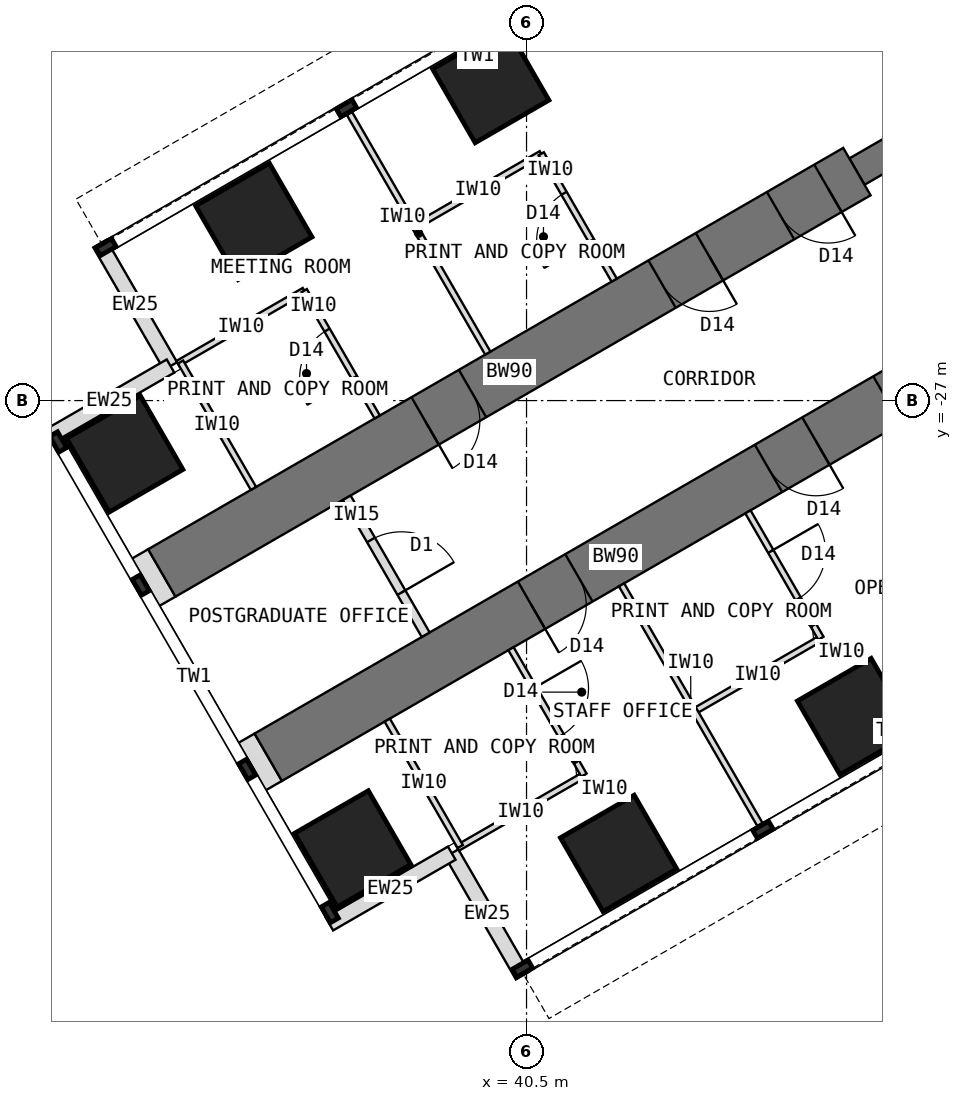
"""IFC4 building model, lengths in metres.
Left out: names, types, materials, properties, quantities, classifications, styles, units other than length and angle.
Written with IfcOpenShell. Run it as: python <this file> out.ifc"""

import sys

from ifc_helpers import new_model, si_unit, direction, frame, frame_2d, origin, origin_2d, place, context, subcontext, project, spatial, rectangle, extrude, element, fill, save


model = new_model("IFC4")
c1 = context("Model", 3, precision=1e-05, world=origin(), true_north=direction((0.0, 1.0)))
c2 = subcontext(c1, "Body", "Model", "MODEL_VIEW")
j1 = project(units=[si_unit("LENGTHUNIT", "METRE"), si_unit("PLANEANGLEUNIT", "RADIAN")], contexts=[c1])
p1 = place(None, origin())
s1 = spatial("IfcSite", under=j1, at=p1, CompositionType="ELEMENT")
p2 = place(p1, origin())
s2 = spatial("IfcBuilding", under=s1, at=p2, CompositionType="ELEMENT")
p3 = place(p2, frame((0.0, 0.0, 76.5)))
s3 = spatial("IfcBuildingStorey", under=s2, at=p3, CompositionType="ELEMENT", Elevation=76.5)
p4 = place(p3, frame((45.904, -18.0, 0.0), z_axis=(0.0, 0.0, 1.0), x_axis=(0.500024481964, -0.866011268655, 0.0)))
e1 = element("IfcWall", 1, at=p4, inside=s3, PredefinedType="SHEAR", context=c2, shape_type="SweptSolid", body=[
    extrude(rectangle(XDim=4.548, YDim=0.7, at=frame_2d((2.274, 0.0))), origin(), (0.0, 0.0, 1.0), 4.0),
])
p5 = place(p3, frame((47.684, -26.266, 0.0), z_axis=(0.0, 0.0, 1.0), x_axis=(-0.866027579429, -0.499996231654, 0.0)))
e2 = element("IfcWall", 2, at=p5, inside=s3, PredefinedType="SHEAR", context=c2, shape_type="SweptSolid", body=[
    extrude(rectangle(XDim=13.2, YDim=0.9, at=frame_2d((6.6, 0.0))), origin(), (0.0, 0.0, 1.0), 4.0),
])
p6 = place(p5, frame((0.55, 0.0, 0.0)))
e3 = element("IfcOpeningElement", 3, at=p6, cuts=e2, PredefinedType="OPENING", context=c2, shape_type="SweptSolid", body=[
    extrude(rectangle(XDim=0.9, YDim=2.1, at=frame_2d((0.45, 1.05))), frame((0.0, 0.46, 0.0), z_axis=(0.0, -1.0, 0.0), x_axis=(1.0, 0.0, 0.0)), (0.0, 0.0, 1.0), 0.92),
])
p7 = place(p5, frame((2.8, 0.0, 0.0)))
e4 = element("IfcOpeningElement", 4, at=p7, cuts=e2, PredefinedType="OPENING", context=c2, shape_type="SweptSolid", body=[
    extrude(rectangle(XDim=0.9, YDim=2.1, at=frame_2d((0.45, 1.05))), frame((0.0, 0.46, 0.0), z_axis=(0.0, -1.0, 0.0), x_axis=(1.0, 0.0, 0.0)), (0.0, 0.0, 1.0), 0.92),
])
p8 = place(p5, frame((7.3, 0.0, 0.0)))
e5 = element("IfcOpeningElement", 5, at=p8, cuts=e2, PredefinedType="OPENING", context=c2, shape_type="SweptSolid", body=[
    extrude(rectangle(XDim=0.9, YDim=2.1, at=frame_2d((0.45, 1.05))), frame((0.0, 0.46, 0.0), z_axis=(0.0, -1.0, 0.0), x_axis=(1.0, 0.0, 0.0)), (0.0, 0.0, 1.0), 0.92),
])
p9 = place(p3, frame((48.178, -21.939, 0.0), z_axis=(0.0, 0.0, 1.0), x_axis=(-0.866072649678, -0.499918158782, 0.0)))
e6 = element("IfcWall", 6, at=p9, inside=s3, PredefinedType="SHEAR", context=c2, shape_type="SweptSolid", body=[
    extrude(rectangle(XDim=2.592, YDim=0.5, at=frame_2d((1.296, 0.0))), origin(), (0.0, 0.0, 1.0), 4.0),
])
p10 = place(p3, frame((45.934, -23.234, 0.0), z_axis=(0.0, 0.0, 1.0), x_axis=(-0.866019570528, -0.500010103361, 0.0)))
e7 = element("IfcWall", 7, at=p10, inside=s3, PredefinedType="SHEAR", context=c2, shape_type="SweptSolid", body=[
    extrude(rectangle(XDim=13.2, YDim=0.9, at=frame_2d((6.6, 0.0))), origin(), (0.0, 0.0, 1.0), 4.0),
])
p11 = place(p10, frame((0.55, 0.0, 0.0)))
e8 = element("IfcOpeningElement", 8, at=p11, cuts=e7, PredefinedType="OPENING", context=c2, shape_type="SweptSolid", body=[
    extrude(rectangle(XDim=0.9, YDim=2.1, at=frame_2d((0.45, 1.05))), frame((0.0, 0.46, 0.0), z_axis=(0.0, -1.0, 0.0), x_axis=(1.0, 0.0, 0.0)), (0.0, 0.0, 1.0), 0.92),
])
p12 = place(p10, frame((2.8, 0.0, 0.0)))
e9 = element("IfcOpeningElement", 9, at=p12, cuts=e7, PredefinedType="OPENING", context=c2, shape_type="SweptSolid", body=[
    extrude(rectangle(XDim=0.9, YDim=2.1, at=frame_2d((0.45, 1.05))), frame((0.0, 0.46, 0.0), z_axis=(0.0, -1.0, 0.0), x_axis=(1.0, 0.0, 0.0)), (0.0, 0.0, 1.0), 0.92),
])
p13 = place(p10, frame((7.3, 0.0, 0.0)))
e10 = element("IfcOpeningElement", 10, at=p13, cuts=e7, PredefinedType="OPENING", context=c2, shape_type="SweptSolid", body=[
    extrude(rectangle(XDim=0.9, YDim=2.1, at=frame_2d((0.45, 1.05))), frame((0.0, 0.46, 0.0), z_axis=(0.0, -1.0, 0.0), x_axis=(1.0, 0.0, 0.0)), (0.0, 0.0, 1.0), 0.92),
])
for number, where, z_axis, x_axis in (
    (11, (45.912, -32.196, 0.0), (0.0, 0.0, 1.0), (0.866, 0.5, 0.0)),
    (12, (39.912, -21.804, 0.0), (0.0, 0.0, 1.0), (0.866, 0.5, 0.0)),
    (13, (42.014, -34.446, 0.0), (0.0, 0.0, 1.0), (0.866, 0.5, 0.0)),
    (14, (36.014, -24.054, 0.0), (0.0, 0.0, 1.0), (0.866, 0.5, 0.0)),
    (15, (37.642, -34.373, 0.0), (0.0, 0.0, 1.0), (0.866, 0.5, 0.0)),
    (16, (33.892, -27.877, 0.0), (0.0, 0.0, 1.0), (0.866, 0.5, 0.0)),
):
    element("IfcColumn", number, at=place(p3, frame(where, z_axis=z_axis, x_axis=x_axis)), inside=s3, PredefinedType="COLUMN", context=c2, shape_type="SweptSolid", body=[
        extrude(rectangle(XDim=1.4, YDim=1.4, at=origin_2d()), origin(), (0.0, 0.0, 1.0), 4.0),
    ])
for number, where, z_axis, x_axis in (
    (17, (40.433, -36.456, 0.0), (0.0, 0.0, 1.0), (-0.5, 0.866, 0.0)),
    (18, (39.27, -34.443, 0.0), (0.0, 0.0, 1.0), (-0.866, -0.5, 0.0)),
    (19, (33.483, -24.419, 0.0), (0.0, 0.0, 1.0), (0.5, -0.866, 0.0)),
    (20, (34.645, -26.432, 0.0), (0.0, 0.0, 1.0), (-0.866, -0.5, 0.0)),
):
    element("IfcWall", number, at=place(p3, frame(where, z_axis=z_axis, x_axis=x_axis)), inside=s3, PredefinedType="STANDARD", context=c2, shape_type="SweptSolid", body=[
        extrude(rectangle(XDim=2.325, YDim=0.25, at=frame_2d((1.163, 0.0))), origin(), (0.0, 0.0, 1.0), 3.8),
    ])
for number, where, z_axis, x_axis in (
    (21, (36.252, -32.865, 0.0), (0.0, 0.0, 1.0), (-0.866, -0.5, 0.0)),
    (22, (34.502, -29.834, 0.0), (0.0, 0.0, 1.0), (-0.866, -0.5, 0.0)),
):
    element("IfcWall", number, at=place(p3, frame(where, z_axis=z_axis, x_axis=x_axis)), inside=s3, PredefinedType="PARTITIONING", context=c2, shape_type="SweptSolid", body=[
        extrude(rectangle(XDim=0.31, YDim=0.9, at=frame_2d((0.155, 0.0))), origin(), (0.0, 0.0, 1.0), 3.8),
    ])
p14 = place(p3, frame((42.063, -30.03, 0.0), z_axis=(0.0, 0.0, 1.0), x_axis=(0.499982560684, -0.866035472144, 0.0)))
e23 = element("IfcWall", 23, at=p14, inside=s3, PredefinedType="PARTITIONING", context=c2, shape_type="SweptSolid", body=[
    extrude(rectangle(XDim=4.55, YDim=0.1, at=frame_2d((2.275, 0.0))), origin(), (0.0, 0.0, 1.0), 3.8),
])
p15 = place(p3, frame((45.342, -30.909, 0.0), z_axis=(0.0, 0.0, 1.0), x_axis=(-0.866050077142, -0.499957262057, 0.0)))
e24 = element("IfcWall", 24, at=p15, inside=s3, PredefinedType="PARTITIONING", context=c2, shape_type="SweptSolid", body=[
    extrude(rectangle(XDim=2.4, YDim=0.1, at=frame_2d((1.2, 0.0))), origin(), (0.0, 0.0, 1.0), 3.8),
])
p16 = place(p3, frame((44.141, -28.83, 0.0), z_axis=(0.0, 0.0, 1.0), x_axis=(0.500077600433, -0.865980596518, 0.0)))
e25 = element("IfcWall", 25, at=p16, inside=s3, PredefinedType="PARTITIONING", context=c2, shape_type="SweptSolid", body=[
    extrude(rectangle(XDim=2.4, YDim=0.1, at=frame_2d((1.2, 0.0))), origin(), (0.0, 0.0, 1.0), 3.8),
])
p17 = place(p16, frame((0.75, 0.0, 0.0)))
e26 = element("IfcOpeningElement", 26, at=p17, cuts=e25, PredefinedType="OPENING", context=c2, shape_type="SweptSolid", body=[
    extrude(rectangle(XDim=0.9, YDim=2.1, at=frame_2d((0.45, 1.05))), frame((0.0, 0.06, 0.0), z_axis=(0.0, -1.0, 0.0), x_axis=(1.0, 0.0, 0.0)), (0.0, 0.0, 1.0), 0.12),
])
p18 = place(p3, frame((41.444, -33.159, 0.0), z_axis=(0.0, 0.0, 1.0), x_axis=(-0.866024647952, -0.500001309137, 0.0)))
e27 = element("IfcWall", 27, at=p18, inside=s3, PredefinedType="PARTITIONING", context=c2, shape_type="SweptSolid", body=[
    extrude(rectangle(XDim=2.4, YDim=0.1, at=frame_2d((1.2, 0.0))), origin(), (0.0, 0.0, 1.0), 3.8),
])
p19 = place(p3, frame((40.244, -31.08, 0.0), z_axis=(0.0, 0.0, 1.0), x_axis=(0.500001309137, -0.866024647952, 0.0)))
e28 = element("IfcWall", 28, at=p19, inside=s3, PredefinedType="PARTITIONING", context=c2, shape_type="SweptSolid", body=[
    extrude(rectangle(XDim=2.4, YDim=0.1, at=frame_2d((1.2, 0.0))), origin(), (0.0, 0.0, 1.0), 3.8),
])
p20 = place(p19, frame((0.75, 0.0, 0.0)))
e29 = element("IfcOpeningElement", 29, at=p20, cuts=e28, PredefinedType="OPENING", context=c2, shape_type="SweptSolid", body=[
    extrude(rectangle(XDim=0.9, YDim=2.1, at=frame_2d((0.45, 1.05))), frame((0.0, 0.06, 0.0), z_axis=(0.0, -1.0, 0.0), x_axis=(1.0, 0.0, 0.0)), (0.0, 0.0, 1.0), 0.12),
])
p21 = place(p3, frame((38.209, -32.255, 0.0), z_axis=(0.0, 0.0, 1.0), x_axis=(0.500001309137, -0.866024647952, 0.0)))
e30 = element("IfcWall", 30, at=p21, inside=s3, PredefinedType="PARTITIONING", context=c2, shape_type="SweptSolid", body=[
    extrude(rectangle(XDim=2.4, YDim=0.1, at=frame_2d((1.2, 0.0))), origin(), (0.0, 0.0, 1.0), 3.8),
])
p22 = place(p3, frame((39.863, -26.22, 0.0), z_axis=(0.0, 0.0, 1.0), x_axis=(-0.500022803284, 0.866012237902, 0.0)))
e31 = element("IfcWall", 31, at=p22, inside=s3, PredefinedType="PARTITIONING", context=c2, shape_type="SweptSolid", body=[
    extrude(rectangle(XDim=4.55, YDim=0.1, at=frame_2d((2.275, 0.0))), origin(), (0.0, 0.0, 1.0), 3.8),
])
p23 = place(p3, frame((40.741, -22.941, 0.0), z_axis=(0.0, 0.0, 1.0), x_axis=(-0.865980596518, -0.500077600433, 0.0)))
e32 = element("IfcWall", 32, at=p23, inside=s3, PredefinedType="PARTITIONING", context=c2, shape_type="SweptSolid", body=[
    extrude(rectangle(XDim=2.4, YDim=0.1, at=frame_2d((1.2, 0.0))), origin(), (0.0, 0.0, 1.0), 3.8),
])
p24 = place(p3, frame((41.941, -25.02, 0.0), z_axis=(0.0, 0.0, 1.0), x_axis=(-0.499957262057, 0.866050077142, 0.0)))
e33 = element("IfcWall", 33, at=p24, inside=s3, PredefinedType="PARTITIONING", context=c2, shape_type="SweptSolid", body=[
    extrude(rectangle(XDim=2.4, YDim=0.1, at=frame_2d((1.2, 0.0))), origin(), (0.0, 0.0, 1.0), 3.8),
])
p25 = place(p24, frame((0.75, 0.0, 0.0)))
e34 = element("IfcOpeningElement", 34, at=p25, cuts=e33, PredefinedType="OPENING", context=c2, shape_type="SweptSolid", body=[
    extrude(rectangle(XDim=0.9, YDim=2.1, at=frame_2d((0.45, 1.05))), frame((0.0, 0.06, 0.0), z_axis=(0.0, -1.0, 0.0), x_axis=(1.0, 0.0, 0.0)), (0.0, 0.0, 1.0), 0.12),
])
p26 = place(p3, frame((36.844, -25.191, 0.0), z_axis=(0.0, 0.0, 1.0), x_axis=(-0.865980596518, -0.500077600433, 0.0)))
e35 = element("IfcWall", 35, at=p26, inside=s3, PredefinedType="PARTITIONING", context=c2, shape_type="SweptSolid", body=[
    extrude(rectangle(XDim=2.4, YDim=0.1, at=frame_2d((1.2, 0.0))), origin(), (0.0, 0.0, 1.0), 3.8),
])
p27 = place(p3, frame((38.044, -27.27, 0.0), z_axis=(0.0, 0.0, 1.0), x_axis=(-0.500033551112, 0.866006032174, 0.0)))
e36 = element("IfcWall", 36, at=p27, inside=s3, PredefinedType="PARTITIONING", context=c2, shape_type="SweptSolid", body=[
    extrude(rectangle(XDim=2.4, YDim=0.1, at=frame_2d((1.2, 0.0))), origin(), (0.0, 0.0, 1.0), 3.8),
])
p28 = place(p27, frame((0.75, 0.0, 0.0)))
e37 = element("IfcOpeningElement", 37, at=p28, cuts=e36, PredefinedType="OPENING", context=c2, shape_type="SweptSolid", body=[
    extrude(rectangle(XDim=0.9, YDim=2.1, at=frame_2d((0.45, 1.05))), frame((0.0, 0.06, 0.0), z_axis=(0.0, -1.0, 0.0), x_axis=(1.0, 0.0, 0.0)), (0.0, 0.0, 1.0), 0.12),
])
p29 = place(p3, frame((36.009, -28.445, 0.0), z_axis=(0.0, 0.0, 1.0), x_axis=(-0.500033551112, 0.866006032174, 0.0)))
e38 = element("IfcWall", 38, at=p29, inside=s3, PredefinedType="PARTITIONING", context=c2, shape_type="SweptSolid", body=[
    extrude(rectangle(XDim=2.4, YDim=0.1, at=frame_2d((1.2, 0.0))), origin(), (0.0, 0.0, 1.0), 3.8),
])
p30 = place(p3, frame((37.542, -28.599, 0.0), z_axis=(0.0, 0.0, 1.0), x_axis=(0.500006934395, -0.866021400173, 0.0)))
e39 = element("IfcWall", 39, at=p30, inside=s3, PredefinedType="PARTITIONING", context=c2, shape_type="SweptSolid", body=[
    extrude(rectangle(XDim=2.6, YDim=0.15, at=frame_2d((1.3, 0.0))), origin(), (0.0, 0.0, 1.0), 3.8),
])
p31 = place(p30, frame((0.8, 0.0, 0.0)))
e40 = element("IfcOpeningElement", 40, at=p31, cuts=e39, PredefinedType="OPENING", context=c2, shape_type="SweptSolid", body=[
    extrude(rectangle(XDim=1.0, YDim=2.1, at=frame_2d((0.5, 1.05))), frame((0.0, 0.085, 0.0), z_axis=(0.0, -1.0, 0.0), x_axis=(1.0, 0.0, 0.0)), (0.0, 0.0, 1.0), 0.17),
])
p32 = place(p17, origin())
e41 = element("IfcDoor", 41, at=p32, inside=s3, OperationType="SINGLE_SWING_LEFT", PredefinedType="DOOR", context=c2, shape_type="SweptSolid", body=[
    extrude(rectangle(XDim=0.9, YDim=2.1, at=frame_2d((0.45, 1.05))), frame((0.0, 0.025, 0.0), z_axis=(0.0, -1.0, 0.0), x_axis=(1.0, 0.0, 0.0)), (0.0, 0.0, 1.0), 0.05),
])
fill(e26, e41)
p33 = place(p20, origin())
e42 = element("IfcDoor", 42, at=p33, inside=s3, OperationType="SINGLE_SWING_LEFT", PredefinedType="DOOR", context=c2, shape_type="SweptSolid", body=[
    extrude(rectangle(XDim=0.9, YDim=2.1, at=frame_2d((0.45, 1.05))), frame((0.0, 0.025, 0.0), z_axis=(0.0, -1.0, 0.0), x_axis=(1.0, 0.0, 0.0)), (0.0, 0.0, 1.0), 0.05),
])
fill(e29, e42)
p34 = place(p25, origin())
e43 = element("IfcDoor", 43, at=p34, inside=s3, OperationType="SINGLE_SWING_LEFT", PredefinedType="DOOR", context=c2, shape_type="SweptSolid", body=[
    extrude(rectangle(XDim=0.9, YDim=2.1, at=frame_2d((0.45, 1.05))), frame((0.0, 0.025, 0.0), z_axis=(0.0, -1.0, 0.0), x_axis=(1.0, 0.0, 0.0)), (0.0, 0.0, 1.0), 0.05),
])
fill(e34, e43)
p35 = place(p28, origin())
e44 = element("IfcDoor", 44, at=p35, inside=s3, OperationType="SINGLE_SWING_LEFT", PredefinedType="DOOR", context=c2, shape_type="SweptSolid", body=[
    extrude(rectangle(XDim=0.9, YDim=2.1, at=frame_2d((0.45, 1.05))), frame((0.0, 0.025, 0.0), z_axis=(0.0, -1.0, 0.0), x_axis=(1.0, 0.0, 0.0)), (0.0, 0.0, 1.0), 0.05),
])
fill(e37, e44)
p36 = place(p31, origin())
e45 = element("IfcDoor", 45, at=p36, inside=s3, OperationType="SINGLE_SWING_RIGHT", PredefinedType="DOOR", context=c2, shape_type="SweptSolid", body=[
    extrude(rectangle(XDim=1.0, YDim=2.1, at=frame_2d((0.5, 1.05))), frame((0.0, 0.025, 0.0), z_axis=(0.0, -1.0, 0.0), x_axis=(1.0, 0.0, 0.0)), (0.0, 0.0, 1.0), 0.05),
])
fill(e40, e45)
p37 = place(p6, origin())
e46 = element("IfcDoor", 46, at=p37, inside=s3, OperationType="SINGLE_SWING_LEFT", PredefinedType="DOOR", context=c2, shape_type="SweptSolid", body=[
    extrude(rectangle(XDim=0.82, YDim=2.06, at=frame_2d((0.45, 1.03))), frame((0.0, 0.025, 0.0), z_axis=(0.0, -1.0, 0.0), x_axis=(1.0, 0.0, 0.0)), (0.0, 0.0, 1.0), 0.05),
    extrude(rectangle(XDim=0.04, YDim=2.1, at=frame_2d((0.02, 1.05))), frame((0.0, 0.45, 0.0), z_axis=(0.0, -1.0, 0.0), x_axis=(1.0, 0.0, 0.0)), (0.0, 0.0, 1.0), 0.899),
    extrude(rectangle(XDim=0.04, YDim=2.1, at=frame_2d((0.88, 1.05))), frame((0.0, 0.45, 0.0), z_axis=(0.0, -1.0, 0.0), x_axis=(1.0, 0.0, 0.0)), (0.0, 0.0, 1.0), 0.899),
    extrude(rectangle(XDim=0.82, YDim=0.04, at=frame_2d((0.45, 2.08))), frame((0.0, 0.45, 0.0), z_axis=(0.0, -1.0, 0.0), x_axis=(1.0, 0.0, 0.0)), (0.0, 0.0, 1.0), 0.899),
])
fill(e3, e46)
p38 = place(p7, origin())
e47 = element("IfcDoor", 47, at=p38, inside=s3, OperationType="SINGLE_SWING_LEFT", PredefinedType="DOOR", context=c2, shape_type="SweptSolid", body=[
    extrude(rectangle(XDim=0.82, YDim=2.06, at=frame_2d((0.45, 1.03))), frame((0.0, 0.025, 0.0), z_axis=(0.0, -1.0, 0.0), x_axis=(1.0, 0.0, 0.0)), (0.0, 0.0, 1.0), 0.05),
    extrude(rectangle(XDim=0.04, YDim=2.1, at=frame_2d((0.02, 1.05))), frame((0.0, 0.45, 0.0), z_axis=(0.0, -1.0, 0.0), x_axis=(1.0, 0.0, 0.0)), (0.0, 0.0, 1.0), 0.899),
    extrude(rectangle(XDim=0.04, YDim=2.1, at=frame_2d((0.88, 1.05))), frame((0.0, 0.45, 0.0), z_axis=(0.0, -1.0, 0.0), x_axis=(1.0, 0.0, 0.0)), (0.0, 0.0, 1.0), 0.899),
    extrude(rectangle(XDim=0.82, YDim=0.04, at=frame_2d((0.45, 2.08))), frame((0.0, 0.45, 0.0), z_axis=(0.0, -1.0, 0.0), x_axis=(1.0, 0.0, 0.0)), (0.0, 0.0, 1.0), 0.899),
])
fill(e4, e47)
p39 = place(p8, origin())
e48 = element("IfcDoor", 48, at=p39, inside=s3, OperationType="SINGLE_SWING_RIGHT", PredefinedType="DOOR", context=c2, shape_type="SweptSolid", body=[
    extrude(rectangle(XDim=0.82, YDim=2.06, at=frame_2d((0.45, 1.03))), frame((0.0, 0.025, 0.0), z_axis=(0.0, -1.0, 0.0), x_axis=(1.0, 0.0, 0.0)), (0.0, 0.0, 1.0), 0.05),
    extrude(rectangle(XDim=0.04, YDim=2.1, at=frame_2d((0.02, 1.05))), frame((0.0, 0.45, 0.0), z_axis=(0.0, -1.0, 0.0), x_axis=(1.0, 0.0, 0.0)), (0.0, 0.0, 1.0), 0.899),
    extrude(rectangle(XDim=0.04, YDim=2.1, at=frame_2d((0.88, 1.05))), frame((0.0, 0.45, 0.0), z_axis=(0.0, -1.0, 0.0), x_axis=(1.0, 0.0, 0.0)), (0.0, 0.0, 1.0), 0.899),
    extrude(rectangle(XDim=0.82, YDim=0.04, at=frame_2d((0.45, 2.08))), frame((0.0, 0.45, 0.0), z_axis=(0.0, -1.0, 0.0), x_axis=(1.0, 0.0, 0.0)), (0.0, 0.0, 1.0), 0.899),
])
fill(e5, e48)
p40 = place(p11, origin())
e49 = element("IfcDoor", 49, at=p40, inside=s3, OperationType="SINGLE_SWING_LEFT", PredefinedType="DOOR", context=c2, shape_type="SweptSolid", body=[
    extrude(rectangle(XDim=0.82, YDim=2.06, at=frame_2d((0.45, 1.03))), frame((0.0, 0.025, 0.0), z_axis=(0.0, -1.0, 0.0), x_axis=(1.0, 0.0, 0.0)), (0.0, 0.0, 1.0), 0.05),
    extrude(rectangle(XDim=0.04, YDim=2.1, at=frame_2d((0.02, 1.05))), frame((0.0, 0.45, 0.0), z_axis=(0.0, -1.0, 0.0), x_axis=(1.0, 0.0, 0.0)), (0.0, 0.0, 1.0), 0.899),
    extrude(rectangle(XDim=0.04, YDim=2.1, at=frame_2d((0.88, 1.05))), frame((0.0, 0.45, 0.0), z_axis=(0.0, -1.0, 0.0), x_axis=(1.0, 0.0, 0.0)), (0.0, 0.0, 1.0), 0.899),
    extrude(rectangle(XDim=0.82, YDim=0.04, at=frame_2d((0.45, 2.08))), frame((0.0, 0.45, 0.0), z_axis=(0.0, -1.0, 0.0), x_axis=(1.0, 0.0, 0.0)), (0.0, 0.0, 1.0), 0.899),
])
fill(e8, e49)
p41 = place(p12, origin())
e50 = element("IfcDoor", 50, at=p41, inside=s3, OperationType="SINGLE_SWING_LEFT", PredefinedType="DOOR", context=c2, shape_type="SweptSolid", body=[
    extrude(rectangle(XDim=0.82, YDim=2.06, at=frame_2d((0.45, 1.03))), frame((0.0, 0.025, 0.0), z_axis=(0.0, -1.0, 0.0), x_axis=(1.0, 0.0, 0.0)), (0.0, 0.0, 1.0), 0.05),
    extrude(rectangle(XDim=0.04, YDim=2.1, at=frame_2d((0.02, 1.05))), frame((0.0, 0.45, 0.0), z_axis=(0.0, -1.0, 0.0), x_axis=(1.0, 0.0, 0.0)), (0.0, 0.0, 1.0), 0.899),
    extrude(rectangle(XDim=0.04, YDim=2.1, at=frame_2d((0.88, 1.05))), frame((0.0, 0.45, 0.0), z_axis=(0.0, -1.0, 0.0), x_axis=(1.0, 0.0, 0.0)), (0.0, 0.0, 1.0), 0.899),
    extrude(rectangle(XDim=0.82, YDim=0.04, at=frame_2d((0.45, 2.08))), frame((0.0, 0.45, 0.0), z_axis=(0.0, -1.0, 0.0), x_axis=(1.0, 0.0, 0.0)), (0.0, 0.0, 1.0), 0.899),
])
fill(e9, e50)
p42 = place(p13, origin())
e51 = element("IfcDoor", 51, at=p42, inside=s3, OperationType="SINGLE_SWING_RIGHT", PredefinedType="DOOR", context=c2, shape_type="SweptSolid", body=[
    extrude(rectangle(XDim=0.82, YDim=2.06, at=frame_2d((0.45, 1.03))), frame((0.0, 0.025, 0.0), z_axis=(0.0, -1.0, 0.0), x_axis=(1.0, 0.0, 0.0)), (0.0, 0.0, 1.0), 0.05),
    extrude(rectangle(XDim=0.04, YDim=2.1, at=frame_2d((0.02, 1.05))), frame((0.0, 0.45, 0.0), z_axis=(0.0, -1.0, 0.0), x_axis=(1.0, 0.0, 0.0)), (0.0, 0.0, 1.0), 0.899),
    extrude(rectangle(XDim=0.04, YDim=2.1, at=frame_2d((0.88, 1.05))), frame((0.0, 0.45, 0.0), z_axis=(0.0, -1.0, 0.0), x_axis=(1.0, 0.0, 0.0)), (0.0, 0.0, 1.0), 0.899),
    extrude(rectangle(XDim=0.82, YDim=0.04, at=frame_2d((0.45, 2.08))), frame((0.0, 0.45, 0.0), z_axis=(0.0, -1.0, 0.0), x_axis=(1.0, 0.0, 0.0)), (0.0, 0.0, 1.0), 0.899),
])
fill(e10, e51)
save(model, sys.argv[1])
